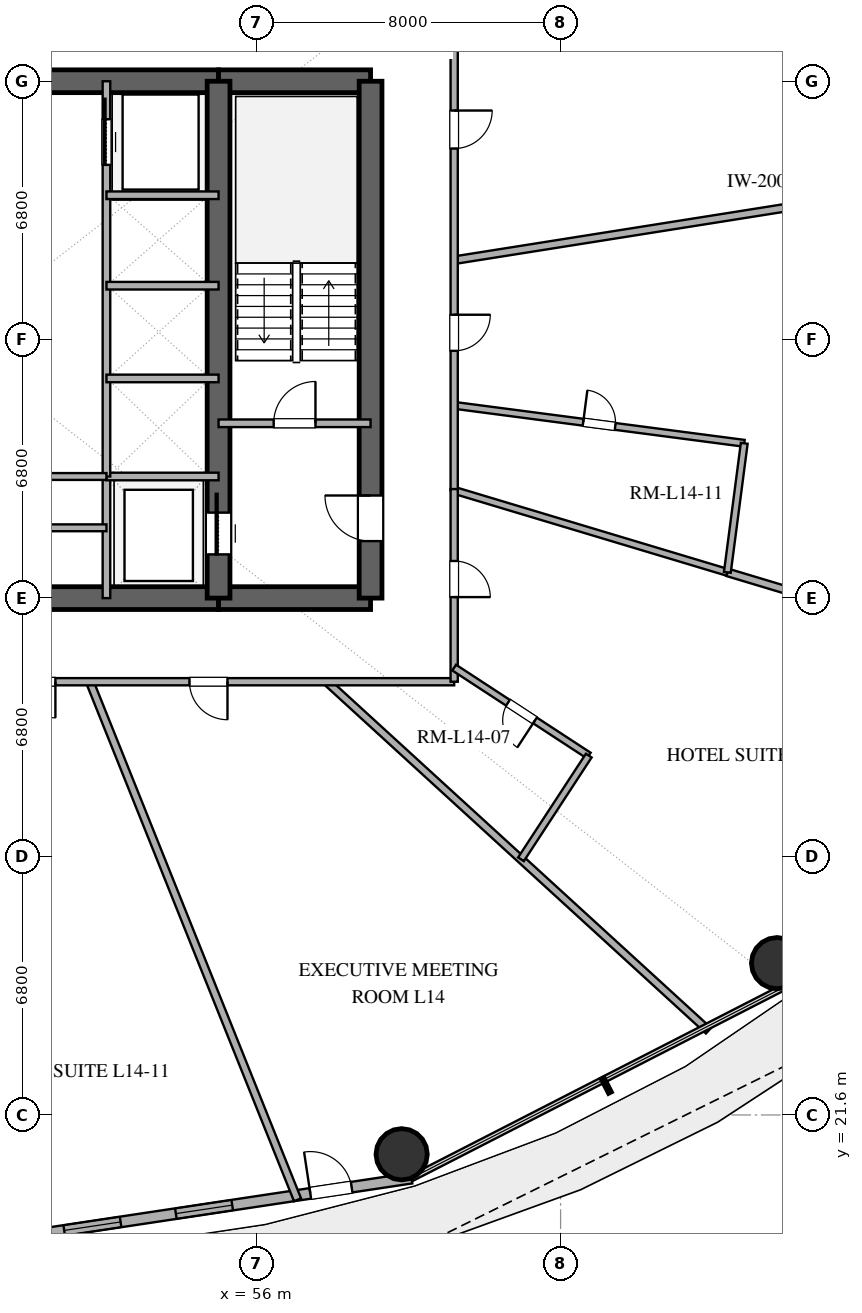
"""IFC4 building model, lengths in metres.
Left out: names, types, materials, properties, quantities, classifications, styles, units other than length and angle.
Written with IfcOpenShell. Run it as: python <this file> out.ifc"""

import sys

from ifc_helpers import new_model, si_unit, direction, frame, frame_2d, origin, origin_2d, place, context, subcontext, project, spatial, rectangle, hollow_circle, extrude, element, fill, save


model = new_model("IFC4")
c1 = context("Model", 3, precision=1e-05, world=origin(), true_north=direction((0.0, 1.0)))
c2 = subcontext(c1, "Body", "Model", "MODEL_VIEW")
j1 = project(units=[si_unit("LENGTHUNIT", "METRE"), si_unit("PLANEANGLEUNIT", "RADIAN")], contexts=[c1])
p1 = place(None, origin())
s1 = spatial("IfcSite", under=j1, at=p1, CompositionType="ELEMENT")
p2 = place(p1, origin())
s2 = spatial("IfcBuilding", under=s1, at=p2, CompositionType="ELEMENT")
p3 = place(p2, frame((0.0, 0.0, 60.6)))
s3 = spatial("IfcBuildingStorey", under=s2, at=p3, CompositionType="ELEMENT", Elevation=60.6)
p4 = place(p3, frame((41.0, 35.2, 0.0), z_axis=(0.0, 0.0, 1.0), x_axis=(1.0, 0.0, 0.0)))
e1 = element("IfcWall", 1, at=p4, inside=s3, PredefinedType="SHEAR", context=c2, shape_type="SweptSolid", body=[
    extrude(rectangle(XDim=14.0, YDim=0.6, at=frame_2d((7.0, 0.0))), origin(), (0.0, 0.0, 1.0), 3.38),
])
p5 = place(p4, frame((6.1, 0.0, 0.0)))
e2 = element("IfcOpeningElement", 2, at=p5, cuts=e1, PredefinedType="OPENING", context=c2, shape_type="SweptSolid", body=[
    extrude(rectangle(XDim=1.8, YDim=2.25, at=frame_2d((0.9, 1.125))), frame((0.0, 0.31, 0.0), z_axis=(0.0, -1.0, 0.0), x_axis=(1.0, 0.0, 0.0)), (0.0, 0.0, 1.0), 0.62),
])
p6 = place(p3, frame((55.0, 35.2, 0.0), z_axis=(0.0, 0.0, 1.0), x_axis=(1.0, 0.0, 0.0)))
e3 = element("IfcWall", 3, at=p6, inside=s3, PredefinedType="SHEAR", context=c2, shape_type="SweptSolid", body=[
    extrude(rectangle(XDim=4.0, YDim=0.6, at=frame_2d((2.0, 0.0))), origin(), (0.0, 0.0, 1.0), 3.38),
])
p7 = place(p3, frame((41.0, 48.8, 0.0), z_axis=(0.0, 0.0, 1.0), x_axis=(1.0, 0.0, 0.0)))
e4 = element("IfcWall", 4, at=p7, inside=s3, PredefinedType="SHEAR", context=c2, shape_type="SweptSolid", body=[
    extrude(rectangle(XDim=14.0, YDim=0.6, at=frame_2d((7.0, 0.0))), origin(), (0.0, 0.0, 1.0), 3.38),
])
p8 = place(p7, frame((6.1, 0.0, 0.0)))
e5 = element("IfcOpeningElement", 5, at=p8, cuts=e4, PredefinedType="OPENING", context=c2, shape_type="SweptSolid", body=[
    extrude(rectangle(XDim=1.8, YDim=2.25, at=frame_2d((0.9, 1.125))), frame((0.0, 0.31, 0.0), z_axis=(0.0, -1.0, 0.0), x_axis=(1.0, 0.0, 0.0)), (0.0, 0.0, 1.0), 0.62),
])
p9 = place(p3, frame((55.0, 48.8, 0.0), z_axis=(0.0, 0.0, 1.0), x_axis=(1.0, 0.0, 0.0)))
e6 = element("IfcWall", 6, at=p9, inside=s3, PredefinedType="SHEAR", context=c2, shape_type="SweptSolid", body=[
    extrude(rectangle(XDim=4.0, YDim=0.6, at=frame_2d((2.0, 0.0))), origin(), (0.0, 0.0, 1.0), 3.38),
])
p10 = place(p3, frame((59.0, 35.2, 0.0), z_axis=(0.0, 0.0, 1.0), x_axis=(0.0, 1.0, 0.0)))
e7 = element("IfcWall", 7, at=p10, inside=s3, PredefinedType="SHEAR", context=c2, shape_type="SweptSolid", body=[
    extrude(rectangle(XDim=13.6, YDim=0.6, at=frame_2d((6.8, 0.0))), origin(), (0.0, 0.0, 1.0), 3.38),
])
p11 = place(p10, frame((1.5, 0.0, 0.0)))
e8 = element("IfcOpeningElement", 8, at=p11, cuts=e7, PredefinedType="OPENING", context=c2, shape_type="SweptSolid", body=[
    extrude(rectangle(XDim=1.2, YDim=2.15, at=frame_2d((0.6, 1.075))), frame((0.0, 0.31, 0.0), z_axis=(0.0, -1.0, 0.0), x_axis=(1.0, 0.0, 0.0)), (0.0, 0.0, 1.0), 0.62),
])
p12 = place(p3, frame((55.0, 35.2, 0.0), z_axis=(0.0, 0.0, 1.0), x_axis=(0.0, 1.0, 0.0)))
e9 = element("IfcWall", 9, at=p12, inside=s3, PredefinedType="SHEAR", context=c2, shape_type="SweptSolid", body=[
    extrude(rectangle(XDim=13.6, YDim=0.6, at=frame_2d((6.8, 0.0))), origin(), (0.0, 0.0, 1.0), 3.38),
])
p13 = place(p12, frame((1.15, 0.0, 0.0)))
e10 = element("IfcOpeningElement", 10, at=p13, cuts=e9, PredefinedType="OPENING", context=c2, shape_type="SweptSolid", body=[
    extrude(rectangle(XDim=1.1, YDim=2.2, at=frame_2d((0.55, 1.1))), frame((0.0, 0.31, 0.0), z_axis=(0.0, -1.0, 0.0), x_axis=(1.0, 0.0, 0.0)), (0.0, 0.0, 1.0), 0.62),
])
for number, where, z_axis, x_axis in (
    (11, (59.818, 20.566, 0.0), (0.0, 0.0, 1.0), (1.0, 0.0, 0.0)),
    (12, (69.697, 25.595, 0.0), (0.0, 0.0, 1.0), (1.0, 0.0, 0.0)),
):
    element("IfcColumn", number, at=place(p3, frame(where, z_axis=z_axis, x_axis=x_axis)), inside=s3, PredefinedType="COLUMN", context=c2, shape_type="SweptSolid", body=[
        extrude(hollow_circle(Radius=0.675, WallThickness=0.036, at=origin_2d()), origin(), (0.0, 0.0, 1.0), 3.38),
    ])
p14 = place(p3, frame((48.0, 18.12, 0.0), z_axis=(0.0, 0.0, 1.0), x_axis=(0.988864835849, 0.148816452121, 0.0)))
e13 = element("IfcWall", 13, at=p14, inside=s3, PredefinedType="SOLIDWALL", context=c2, shape_type="SweptSolid", body=[
    extrude(rectangle(XDim=12.214, YDim=0.28, at=frame_2d((6.107, 0.0))), origin(), (0.0, 0.0, 1.0), 3.38),
])
p15 = place(p14, frame((2.972, 0.0, 0.85)))
e14 = element("IfcOpeningElement", 14, at=p15, cuts=e13, PredefinedType="OPENING", context=c2, shape_type="SweptSolid", body=[
    extrude(rectangle(XDim=1.5, YDim=2.0, at=frame_2d((0.75, 1.0))), frame((0.0, 0.15, 0.0), z_axis=(0.0, -1.0, 0.0), x_axis=(1.0, 0.0, 0.0)), (0.0, 0.0, 1.0), 0.3),
])
p16 = place(p14, frame((5.942, 0.0, 0.85)))
e15 = element("IfcOpeningElement", 15, at=p16, cuts=e13, PredefinedType="OPENING", context=c2, shape_type="SweptSolid", body=[
    extrude(rectangle(XDim=1.5, YDim=2.0, at=frame_2d((0.75, 1.0))), frame((0.0, 0.15, 0.0), z_axis=(0.0, -1.0, 0.0), x_axis=(1.0, 0.0, 0.0)), (0.0, 0.0, 1.0), 0.3),
])
p17 = place(p14, frame((9.52, 0.0, 0.0)))
e16 = element("IfcOpeningElement", 16, at=p17, cuts=e13, PredefinedType="OPENING", context=c2, shape_type="SweptSolid", body=[
    extrude(rectangle(XDim=1.1, YDim=2.25, at=frame_2d((0.55, 1.125))), frame((0.0, 0.15, 0.0), z_axis=(0.0, -1.0, 0.0), x_axis=(1.0, 0.0, 0.0)), (0.0, 0.0, 1.0), 0.3),
])
p18 = place(p3, frame((55.0, 39.8, 0.0), z_axis=(0.0, 0.0, 1.0), x_axis=(1.0, 0.0, 0.0)))
e17 = element("IfcWall", 17, at=p18, inside=s3, PredefinedType="SOLIDWALL", context=c2, shape_type="SweptSolid", body=[
    extrude(rectangle(XDim=4.0, YDim=0.2, at=frame_2d((2.0, 0.0))), origin(), (0.0, 0.0, 1.0), 2.74),
])
p19 = place(p18, frame((1.45, 0.0, 0.0)))
e18 = element("IfcOpeningElement", 18, at=p19, cuts=e17, PredefinedType="OPENING", context=c2, shape_type="SweptSolid", body=[
    extrude(rectangle(XDim=1.1, YDim=2.15, at=frame_2d((0.55, 1.075))), frame((0.0, 0.11, 0.0), z_axis=(0.0, -1.0, 0.0), x_axis=(1.0, 0.0, 0.0)), (0.0, 0.0, 1.0), 0.22),
])
p20 = place(p3, frame((52.05, 35.2, 0.0), z_axis=(0.0, 0.0, 1.0), x_axis=(0.0, 1.0, 0.0)))
e19 = element("IfcWall", 19, at=p20, inside=s3, PredefinedType="SOLIDWALL", context=c2, shape_type="SweptSolid", body=[
    extrude(rectangle(XDim=3.2, YDim=0.2, at=frame_2d((1.6, 0.0))), origin(), (0.0, 0.0, 1.0), 2.74),
])
p21 = place(p3, frame((52.05, 38.4, 0.0), z_axis=(0.0, 0.0, 1.0), x_axis=(1.0, 0.0, 0.0)))
e20 = element("IfcWall", 20, at=p21, inside=s3, PredefinedType="SOLIDWALL", context=c2, shape_type="SweptSolid", body=[
    extrude(rectangle(XDim=2.95, YDim=0.2, at=frame_2d((1.475, 0.0))), origin(), (0.0, 0.0, 1.0), 2.74),
])
p22 = place(p3, frame((52.05, 38.4, 0.0), z_axis=(0.0, 0.0, 1.0), x_axis=(0.0, 1.0, 0.0)))
e21 = element("IfcWall", 21, at=p22, inside=s3, PredefinedType="SOLIDWALL", context=c2, shape_type="SweptSolid", body=[
    extrude(rectangle(XDim=10.4, YDim=0.2, at=frame_2d((5.2, 0.0))), origin(), (0.0, 0.0, 1.0), 2.74),
])
p23 = place(p22, frame((8.2, 0.0, 0.0)))
e22 = element("IfcOpeningElement", 22, at=p23, cuts=e21, PredefinedType="OPENING", context=c2, shape_type="SweptSolid", body=[
    extrude(rectangle(XDim=1.2, YDim=2.2, at=frame_2d((0.6, 1.1))), frame((0.0, 0.11, 0.0), z_axis=(0.0, -1.0, 0.0), x_axis=(1.0, 0.0, 0.0)), (0.0, 0.0, 1.0), 0.22),
])
for number, where, z_axis, x_axis in (
    (23, (52.05, 40.98, 0.0), (0.0, 0.0, 1.0), (1.0, 0.0, 0.0)),
    (24, (52.05, 43.42, 0.0), (0.0, 0.0, 1.0), (1.0, 0.0, 0.0)),
    (25, (52.05, 45.8, 0.0), (0.0, 0.0, 1.0), (1.0, 0.0, 0.0)),
):
    element("IfcWall", number, at=place(p3, frame(where, z_axis=z_axis, x_axis=x_axis)), inside=s3, PredefinedType="SOLIDWALL", context=c2, shape_type="SweptSolid", body=[
        extrude(rectangle(XDim=2.95, YDim=0.2, at=frame_2d((1.475, 0.0))), origin(), (0.0, 0.0, 1.0), 2.74),
    ])
for number, where, z_axis, x_axis in (
    (26, (49.2, 37.05, 0.0), (0.0, 0.0, 1.0), (1.0, 0.0, 0.0)),
    (27, (49.2, 38.4, 0.0), (0.0, 0.0, 1.0), (1.0, 0.0, 0.0)),
):
    element("IfcWall", number, at=place(p3, frame(where, z_axis=z_axis, x_axis=x_axis)), inside=s3, PredefinedType="PLUMBINGWALL", context=c2, shape_type="SweptSolid", body=[
        extrude(rectangle(XDim=2.85, YDim=0.18, at=frame_2d((1.425, 0.0))), origin(), (0.0, 0.0, 1.0), 2.74),
    ])
p24 = place(p3, frame((61.2, 44.091, 0.0), z_axis=(0.0, 0.0, 1.0), x_axis=(0.987690823911, 0.156418785194, 0.0)))
e28 = element("IfcWall", 28, at=p24, inside=s3, PredefinedType="PARTITIONING", context=c2, shape_type="SweptSolid", body=[
    extrude(rectangle(XDim=16.735, YDim=0.2, at=frame_2d((8.368, 0.0))), origin(), (0.0, 0.0, 1.0), 2.74),
])
p25 = place(p3, frame((51.61, 33.0, 0.0), z_axis=(0.0, 0.0, 1.0), x_axis=(0.372301847193, -0.928111703717, 0.0)))
e29 = element("IfcWall", 29, at=p25, inside=s3, PredefinedType="PARTITIONING", context=c2, shape_type="SweptSolid", body=[
    extrude(rectangle(XDim=14.688, YDim=0.2, at=frame_2d((7.344, 0.0))), origin(), (0.0, 0.0, 1.0), 2.74),
])
p26 = place(p3, frame((76.816, 33.347, 0.0), z_axis=(0.0, 0.0, 1.0), x_axis=(-0.957749889613, 0.287602414708, 0.0)))
e30 = element("IfcWall", 30, at=p26, inside=s3, PredefinedType="PARTITIONING", context=c2, shape_type="SweptSolid", body=[
    extrude(rectangle(XDim=8.8, YDim=0.2, at=frame_2d((4.4, 0.0))), origin(), (0.0, 0.0, 1.0), 2.74),
])
p27 = place(p3, frame((61.2, 40.272, 0.0), z_axis=(0.0, 0.0, 1.0), x_axis=(0.991543548491, -0.129774386708, 0.0)))
e31 = element("IfcWall", 31, at=p27, inside=s3, PredefinedType="PLUMBINGWALL", context=c2, shape_type="SweptSolid", body=[
    extrude(rectangle(XDim=7.698, YDim=0.18, at=frame_2d((3.849, 0.0))), origin(), (0.0, 0.0, 1.0), 2.74),
])
p28 = place(p27, frame((3.424, 0.0, 0.0)))
e32 = element("IfcOpeningElement", 32, at=p28, cuts=e31, PredefinedType="OPENING", context=c2, shape_type="SweptSolid", body=[
    extrude(rectangle(XDim=0.85, YDim=2.1, at=frame_2d((0.425, 1.05))), frame((0.0, 0.1, 0.0), z_axis=(0.0, -1.0, 0.0), x_axis=(1.0, 0.0, 0.0)), (0.0, 0.0, 1.0), 0.2),
])
p29 = place(p3, frame((68.388, 35.878, 0.0), z_axis=(0.0, 0.0, 1.0), x_axis=(-0.95775642604, 0.28758064674, 0.0)))
e33 = element("IfcWall", 33, at=p29, inside=s3, PredefinedType="PLUMBINGWALL", context=c2, shape_type="SweptSolid", body=[
    extrude(rectangle(XDim=7.506, YDim=0.18, at=frame_2d((3.753, 0.0))), origin(), (0.0, 0.0, 1.0), 2.74),
])
p30 = place(p3, frame((57.846, 33.0, 0.0), z_axis=(0.0, 0.0, 1.0), x_axis=(0.738119160364, -0.674670367738, 0.0)))
e34 = element("IfcWall", 34, at=p30, inside=s3, PredefinedType="PARTITIONING", context=c2, shape_type="SweptSolid", body=[
    extrude(rectangle(XDim=13.61, YDim=0.2, at=frame_2d((6.805, 0.0))), origin(), (0.0, 0.0, 1.0), 2.74),
])
p31 = place(p3, frame((61.2, 51.0, 0.0), z_axis=(0.0, 0.0, 1.0), x_axis=(0.0, -1.0, 0.0)))
e35 = element("IfcWall", 35, at=p31, inside=s3, PredefinedType="PARTITIONING", context=c2, shape_type="SweptSolid", body=[
    extrude(rectangle(XDim=12.964, YDim=0.19, at=frame_2d((6.482, 0.0))), origin(), (0.0, 0.0, 1.0), 2.74),
])
p32 = place(p31, frame((2.971, 0.0, 0.0)))
e36 = element("IfcOpeningElement", 36, at=p32, cuts=e35, PredefinedType="OPENING", context=c2, shape_type="SweptSolid", body=[
    extrude(rectangle(XDim=1.0, YDim=2.2, at=frame_2d((0.5, 1.1))), frame((0.0, 0.105, 0.0), z_axis=(0.0, -1.0, 0.0), x_axis=(1.0, 0.0, 0.0)), (0.0, 0.0, 1.0), 0.21),
])
p33 = place(p31, frame((8.344, 0.0, 0.0)))
e37 = element("IfcOpeningElement", 37, at=p33, cuts=e35, PredefinedType="OPENING", context=c2, shape_type="SweptSolid", body=[
    extrude(rectangle(XDim=0.95, YDim=2.15, at=frame_2d((0.475, 1.075))), frame((0.0, 0.105, 0.0), z_axis=(0.0, -1.0, 0.0), x_axis=(1.0, 0.0, 0.0)), (0.0, 0.0, 1.0), 0.21),
])
p34 = place(p3, frame((61.2, 33.0, 0.0), z_axis=(0.0, 0.0, 1.0), x_axis=(-1.0, 0.0, 0.0)))
e38 = element("IfcWall", 38, at=p34, inside=s3, PredefinedType="PARTITIONING", context=c2, shape_type="SweptSolid", body=[
    extrude(rectangle(XDim=13.839, YDim=0.19, at=frame_2d((6.919, 0.0))), origin(), (0.0, 0.0, 1.0), 2.74),
])
p35 = place(p34, frame((5.965, 0.0, 0.0)))
e39 = element("IfcOpeningElement", 39, at=p35, cuts=e38, PredefinedType="OPENING", context=c2, shape_type="SweptSolid", body=[
    extrude(rectangle(XDim=1.0, YDim=2.2, at=frame_2d((0.5, 1.1))), frame((0.0, 0.105, 0.0), z_axis=(0.0, -1.0, 0.0), x_axis=(1.0, 0.0, 0.0)), (0.0, 0.0, 1.0), 0.21),
])
p36 = place(p34, frame((10.493, 0.0, 0.0)))
e40 = element("IfcOpeningElement", 40, at=p36, cuts=e38, PredefinedType="OPENING", context=c2, shape_type="SweptSolid", body=[
    extrude(rectangle(XDim=0.95, YDim=2.15, at=frame_2d((0.475, 1.075))), frame((0.0, 0.105, 0.0), z_axis=(0.0, -1.0, 0.0), x_axis=(1.0, 0.0, 0.0)), (0.0, 0.0, 1.0), 0.21),
])
p37 = place(p3, frame((61.2, 38.07, 0.0), z_axis=(0.0, 0.0, 1.0), x_axis=(0.0, -1.0, 0.0)))
e41 = element("IfcWall", 41, at=p37, inside=s3, PredefinedType="PARTITIONING", context=c2, shape_type="SweptSolid", body=[
    extrude(rectangle(XDim=5.07, YDim=0.19, at=frame_2d((2.535, 0.0))), origin(), (0.0, 0.0, 1.0), 2.74),
])
p38 = place(p37, frame((1.893, 0.0, 0.0)))
e42 = element("IfcOpeningElement", 42, at=p38, cuts=e41, PredefinedType="OPENING", context=c2, shape_type="SweptSolid", body=[
    extrude(rectangle(XDim=0.95, YDim=2.15, at=frame_2d((0.475, 1.075))), frame((0.0, 0.105, 0.0), z_axis=(0.0, -1.0, 0.0), x_axis=(1.0, 0.0, 0.0)), (0.0, 0.0, 1.0), 0.21),
])
p39 = place(p3, frame((64.742, 31.056, 0.0), z_axis=(0.0, 0.0, 1.0), x_axis=(-0.837031612028, 0.5471545307, 0.0)))
e43 = element("IfcWall", 43, at=p39, inside=s3, PredefinedType="PLUMBINGWALL", context=c2, shape_type="SweptSolid", body=[
    extrude(rectangle(XDim=4.231, YDim=0.18, at=frame_2d((2.116, 0.0))), origin(), (0.0, 0.0, 1.0), 2.74),
])
p40 = place(p39, frame((1.691, 0.0, 0.0)))
e44 = element("IfcOpeningElement", 44, at=p40, cuts=e43, PredefinedType="OPENING", context=c2, shape_type="SweptSolid", body=[
    extrude(rectangle(XDim=0.85, YDim=2.1, at=frame_2d((0.425, 1.05))), frame((0.0, 0.1, 0.0), z_axis=(0.0, -1.0, 0.0), x_axis=(1.0, 0.0, 0.0)), (0.0, 0.0, 1.0), 0.2),
])
p41 = place(p3, frame((68.833, 39.273, 0.0), z_axis=(0.0, 0.0, 1.0), x_axis=(-0.129823772588, -0.991537083558, 0.0)))
e45 = element("IfcWall", 45, at=p41, inside=s3, PredefinedType="PLUMBINGWALL", context=c2, shape_type="SweptSolid", body=[
    extrude(rectangle(XDim=3.425, YDim=0.18, at=frame_2d((1.712, 0.0))), origin(), (0.0, 0.0, 1.0), 2.74),
])
p42 = place(p3, frame((62.958, 28.328, 0.0), z_axis=(0.0, 0.0, 1.0), x_axis=(0.547176717469, 0.837017108463, 0.0)))
e46 = element("IfcWall", 46, at=p42, inside=s3, PredefinedType="PLUMBINGWALL", context=c2, shape_type="SweptSolid", body=[
    extrude(rectangle(XDim=3.26, YDim=0.18, at=frame_2d((1.63, 0.0))), origin(), (0.0, 0.0, 1.0), 2.74),
])
p43 = place(p15, origin())
e47 = element("IfcWindow", 47, at=p43, inside=s3, PartitioningType="SINGLE_PANEL", PredefinedType="WINDOW", context=c2, shape_type="SweptSolid", body=[
    extrude(rectangle(XDim=1.5, YDim=2.0, at=frame_2d((0.75, 1.0))), frame((0.0, 0.03, 0.0), z_axis=(0.0, -1.0, 0.0), x_axis=(1.0, 0.0, 0.0)), (0.0, 0.0, 1.0), 0.06),
])
fill(e14, e47)
p44 = place(p16, origin())
e48 = element("IfcWindow", 48, at=p44, inside=s3, PartitioningType="SINGLE_PANEL", PredefinedType="WINDOW", context=c2, shape_type="SweptSolid", body=[
    extrude(rectangle(XDim=1.5, YDim=2.0, at=frame_2d((0.75, 1.0))), frame((0.0, 0.03, 0.0), z_axis=(0.0, -1.0, 0.0), x_axis=(1.0, 0.0, 0.0)), (0.0, 0.0, 1.0), 0.06),
])
fill(e15, e48)
p45 = place(p17, origin())
e49 = element("IfcDoor", 49, at=p45, inside=s3, OperationType="SINGLE_SWING_LEFT", PredefinedType="DOOR", context=c2, shape_type="SweptSolid", body=[
    extrude(rectangle(XDim=1.1, YDim=2.25, at=frame_2d((0.55, 1.125))), frame((0.0, 0.025, 0.0), z_axis=(0.0, -1.0, 0.0), x_axis=(1.0, 0.0, 0.0)), (0.0, 0.0, 1.0), 0.05),
])
fill(e16, e49)
p46 = place(p13, origin())
e50 = element("IfcDoor", 50, at=p46, inside=s3, OperationType="SLIDING_TO_RIGHT", PredefinedType="DOOR", context=c2, shape_type="SweptSolid", body=[
    extrude(rectangle(XDim=1.1, YDim=2.2, at=frame_2d((0.55, 1.1))), frame((0.0, 0.025, 0.0), z_axis=(0.0, -1.0, 0.0), x_axis=(1.0, 0.0, 0.0)), (0.0, 0.0, 1.0), 0.05),
])
fill(e10, e50)
p47 = place(p11, origin())
e51 = element("IfcDoor", 51, at=p47, inside=s3, OperationType="SINGLE_SWING_RIGHT", PredefinedType="DOOR", context=c2, shape_type="SweptSolid", body=[
    extrude(rectangle(XDim=1.2, YDim=2.15, at=frame_2d((0.6, 1.075))), frame((0.0, 0.025, 0.0), z_axis=(0.0, -1.0, 0.0), x_axis=(1.0, 0.0, 0.0)), (0.0, 0.0, 1.0), 0.05),
])
fill(e8, e51)
p48 = place(p19, origin())
e52 = element("IfcDoor", 52, at=p48, inside=s3, OperationType="SINGLE_SWING_RIGHT", PredefinedType="DOOR", context=c2, shape_type="SweptSolid", body=[
    extrude(rectangle(XDim=1.1, YDim=2.15, at=frame_2d((0.55, 1.075))), frame((0.0, 0.025, 0.0), z_axis=(0.0, -1.0, 0.0), x_axis=(1.0, 0.0, 0.0)), (0.0, 0.0, 1.0), 0.05),
])
fill(e18, e52)
p49 = place(p23, origin())
e53 = element("IfcDoor", 53, at=p49, inside=s3, OperationType="SLIDING_TO_RIGHT", PredefinedType="DOOR", context=c2, shape_type="SweptSolid", body=[
    extrude(rectangle(XDim=1.2, YDim=2.2, at=frame_2d((0.6, 1.1))), frame((0.0, 0.025, 0.0), z_axis=(0.0, -1.0, 0.0), x_axis=(1.0, 0.0, 0.0)), (0.0, 0.0, 1.0), 0.05),
])
fill(e22, e53)
p50 = place(p28, origin())
e54 = element("IfcDoor", 54, at=p50, inside=s3, OperationType="SINGLE_SWING_LEFT", PredefinedType="DOOR", context=c2, shape_type="SweptSolid", body=[
    extrude(rectangle(XDim=0.85, YDim=2.1, at=frame_2d((0.425, 1.05))), frame((0.0, 0.025, 0.0), z_axis=(0.0, -1.0, 0.0), x_axis=(1.0, 0.0, 0.0)), (0.0, 0.0, 1.0), 0.05),
])
fill(e32, e54)
p51 = place(p32, origin())
e55 = element("IfcDoor", 55, at=p51, inside=s3, OperationType="SINGLE_SWING_LEFT", PredefinedType="DOOR", context=c2, shape_type="SweptSolid", body=[
    extrude(rectangle(XDim=1.0, YDim=2.2, at=frame_2d((0.5, 1.1))), frame((0.0, 0.025, 0.0), z_axis=(0.0, -1.0, 0.0), x_axis=(1.0, 0.0, 0.0)), (0.0, 0.0, 1.0), 0.05),
])
fill(e36, e55)
p52 = place(p33, origin())
e56 = element("IfcDoor", 56, at=p52, inside=s3, OperationType="SINGLE_SWING_LEFT", PredefinedType="DOOR", context=c2, shape_type="SweptSolid", body=[
    extrude(rectangle(XDim=0.95, YDim=2.15, at=frame_2d((0.475, 1.075))), frame((0.0, 0.025, 0.0), z_axis=(0.0, -1.0, 0.0), x_axis=(1.0, 0.0, 0.0)), (0.0, 0.0, 1.0), 0.05),
])
fill(e37, e56)
p53 = place(p35, origin())
e57 = element("IfcDoor", 57, at=p53, inside=s3, OperationType="SINGLE_SWING_LEFT", PredefinedType="DOOR", context=c2, shape_type="SweptSolid", body=[
    extrude(rectangle(XDim=1.0, YDim=2.2, at=frame_2d((0.5, 1.1))), frame((0.0, 0.025, 0.0), z_axis=(0.0, -1.0, 0.0), x_axis=(1.0, 0.0, 0.0)), (0.0, 0.0, 1.0), 0.05),
])
fill(e39, e57)
p54 = place(p36, origin())
e58 = element("IfcDoor", 58, at=p54, inside=s3, OperationType="SINGLE_SWING_LEFT", PredefinedType="DOOR", context=c2, shape_type="SweptSolid", body=[
    extrude(rectangle(XDim=0.95, YDim=2.15, at=frame_2d((0.475, 1.075))), frame((0.0, 0.025, 0.0), z_axis=(0.0, -1.0, 0.0), x_axis=(1.0, 0.0, 0.0)), (0.0, 0.0, 1.0), 0.05),
])
fill(e40, e58)
p55 = place(p38, origin())
e59 = element("IfcDoor", 59, at=p55, inside=s3, OperationType="SINGLE_SWING_RIGHT", PredefinedType="DOOR", context=c2, shape_type="SweptSolid", body=[
    extrude(rectangle(XDim=0.95, YDim=2.15, at=frame_2d((0.475, 1.075))), frame((0.0, 0.025, 0.0), z_axis=(0.0, -1.0, 0.0), x_axis=(1.0, 0.0, 0.0)), (0.0, 0.0, 1.0), 0.05),
])
fill(e42, e59)
p56 = place(p40, origin())
e60 = element("IfcDoor", 60, at=p56, inside=s3, OperationType="SINGLE_SWING_LEFT", PredefinedType="DOOR", context=c2, shape_type="SweptSolid", body=[
    extrude(rectangle(XDim=0.85, YDim=2.1, at=frame_2d((0.425, 1.05))), frame((0.0, 0.025, 0.0), z_axis=(0.0, -1.0, 0.0), x_axis=(1.0, 0.0, 0.0)), (0.0, 0.0, 1.0), 0.05),
])
fill(e44, e60)
save(model, sys.argv[1])
